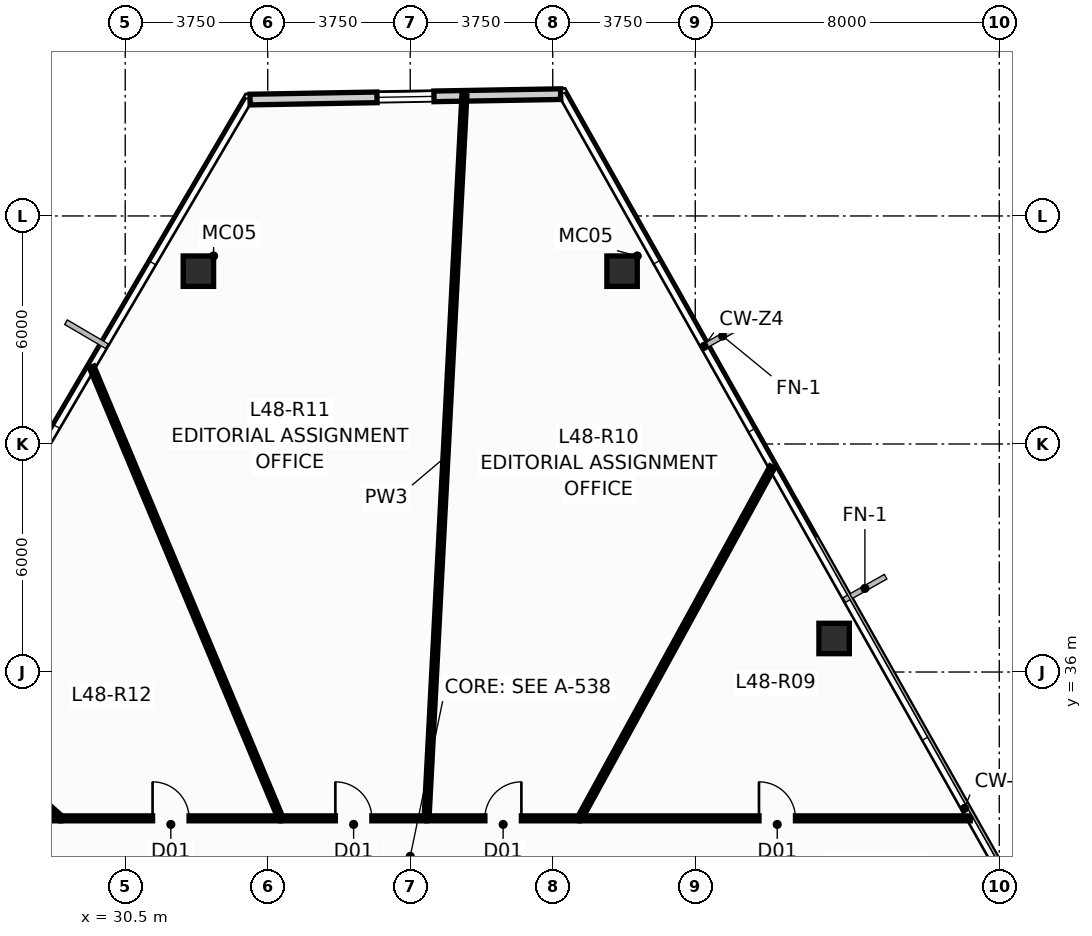
"""IFC4 building model, lengths in metres.
Left out: names, types, materials, properties, quantities, classifications, styles, units other than length and angle.
Written with IfcOpenShell. Run it as: python <this file> out.ifc"""

import sys

from ifc_helpers import new_model, si_unit, direction, frame, frame_2d, origin, origin_2d, place, context, subcontext, project, spatial, rectangle, hollow_rectangle, extrude, source, transform, mapped, element, fill, save


model = new_model("IFC4")
c1 = context("Model", 3, precision=1e-05, world=origin(), true_north=direction((0.0, 1.0)))
c2 = subcontext(c1, "Body", "Model", "MODEL_VIEW")
j1 = project(units=[si_unit("LENGTHUNIT", "METRE"), si_unit("PLANEANGLEUNIT", "RADIAN")], contexts=[c1])
p1 = place(None, origin())
s1 = spatial("IfcSite", under=j1, at=p1, CompositionType="ELEMENT")
p2 = place(p1, origin())
s2 = spatial("IfcBuilding", under=s1, at=p2, CompositionType="ELEMENT")
p3 = place(p2, frame((0.0, 0.0, 184.05)))
s3 = spatial("IfcBuildingStorey", under=s2, at=p3, CompositionType="ELEMENT", Elevation=184.05)
m1 = source(origin(), c2, "Body", "SweptSolid", [
    extrude(hollow_rectangle(XDim=0.8, YDim=0.8, WallThickness=0.045, at=origin_2d()), origin(), (0.0, 0.0, 1.0), 3.651),
])
for number, where, z_axis, x_axis in (
    (1, (43.574, 46.547, 0.0), (-0.024, 0.002, 1.0), (-0.073, -0.997, 0.0)),
    (2, (32.426, 46.547, 0.0), (0.024, 0.002, 1.0), (-0.073, 0.997, 0.0)),
):
    element("IfcColumn", number, at=place(p3, frame(where, z_axis=z_axis, x_axis=x_axis)), inside=s3, PredefinedType="COLUMN", context=c2, shape_type="MappedRepresentation", body=[
        mapped(m1, transform((0.0, 0.0, 0.0), scale=1.0)),
    ])
m2 = source(origin(), c2, "Body", "SweptSolid", [
    extrude(hollow_rectangle(XDim=0.8, YDim=0.8, WallThickness=0.045, at=origin_2d()), origin(), (0.0, 0.0, 1.0), 3.651),
])
p4 = place(p3, frame((49.154, 36.883, 0.0), z_axis=(-0.019393993486, -0.006018825565, 0.999793802119), x_axis=(0.296399214872, -0.955064136811, 0.0)))
e3 = element("IfcColumn", 3, at=p4, inside=s3, PredefinedType="COLUMN", context=c2, shape_type="MappedRepresentation", body=[
    mapped(m2, transform((0.0, 0.0, 0.0), scale=1.0)),
])
p5 = place(p3, frame((33.785, 51.062, 0.0), z_axis=(0.0, 0.0, 1.0), x_axis=(0.999846867057, 0.01749978388, 0.0)))
e4 = element("IfcWall", 4, at=p5, inside=s3, PredefinedType="STANDARD", context=c2, shape_type="SweptSolid", body=[
    extrude(rectangle(XDim=8.175, YDim=0.28, at=frame_2d((4.088, 0.0))), origin(), (0.0, 0.0, 1.0), 3.4),
])
p6 = place(p5, frame((3.34, 0.0, 0.9)))
e5 = element("IfcOpeningElement", 5, at=p6, cuts=e4, PredefinedType="OPENING", context=c2, shape_type="SweptSolid", body=[
    extrude(rectangle(XDim=1.5, YDim=1.8, at=frame_2d((0.75, 0.9))), frame((0.0, 0.152, 0.0), z_axis=(0.0, -1.0, 0.0), x_axis=(1.0, 0.0, 0.0)), (0.0, 0.0, 1.0), 0.304),
])
p7 = place(p3, frame((38.43, 32.155, 0.0), z_axis=(0.0, 0.0, 1.0), x_axis=(0.052271420181, 0.998632914855, 0.0)))
e6 = element("IfcWall", 6, at=p7, inside=s3, PredefinedType="PARTITIONING", context=c2, shape_type="SweptSolid", body=[
    extrude(rectangle(XDim=19.038, YDim=0.13, at=frame_2d((9.519, 0.0))), origin(), (0.0, 0.0, 1.0), 3.4),
])
p8 = place(p3, frame((29.618, 44.026, 0.0), z_axis=(0.0, 0.0, 1.0), x_axis=(0.386205658776, -0.922412700004, 0.0)))
e7 = element("IfcWall", 7, at=p8, inside=s3, PredefinedType="PARTITIONING", context=c2, shape_type="SweptSolid", body=[
    extrude(rectangle(XDim=12.869, YDim=0.13, at=frame_2d((6.435, 0.0))), origin(), (0.0, 0.0, 1.0), 3.4),
])
p9 = place(p3, frame((42.462, 32.154, 0.0), z_axis=(0.0, 0.0, 1.0), x_axis=(0.480713085345, 0.876877944516, 0.0)))
e8 = element("IfcWall", 8, at=p9, inside=s3, PredefinedType="PARTITIONING", context=c2, shape_type="SweptSolid", body=[
    extrude(rectangle(XDim=10.537, YDim=0.13, at=frame_2d((5.269, 0.0))), origin(), (0.0, 0.0, 1.0), 3.4),
])
p10 = place(p3, frame((42.465, 32.15, 0.0), z_axis=(0.0, 0.0, 1.0), x_axis=(1.0, 0.0, 0.0)))
e9 = element("IfcWall", 9, at=p10, inside=s3, PredefinedType="PARTITIONING", context=c2, shape_type="SweptSolid", body=[
    extrude(rectangle(XDim=10.273, YDim=0.13, at=frame_2d((5.137, 0.0))), origin(), (0.0, 0.0, 1.0), 3.4),
])
p11 = place(p10, frame((4.712, 0.0, 0.0)))
e10 = element("IfcOpeningElement", 10, at=p11, cuts=e9, PredefinedType="OPENING", context=c2, shape_type="SweptSolid", body=[
    extrude(rectangle(XDim=0.96, YDim=2.15, at=frame_2d((0.48, 1.075))), frame((0.0, 0.077, 0.0), z_axis=(0.0, -1.0, 0.0), x_axis=(1.0, 0.0, 0.0)), (0.0, 0.0, 1.0), 0.154),
])
p12 = place(p3, frame((22.645, 32.15, 0.0), z_axis=(0.0, 0.0, 1.0), x_axis=(1.0, 0.0, 0.0)))
e11 = element("IfcWall", 11, at=p12, inside=s3, PredefinedType="PARTITIONING", context=c2, shape_type="SweptSolid", body=[
    extrude(rectangle(XDim=6.16, YDim=0.13, at=frame_2d((3.08, 0.0))), origin(), (0.0, 0.0, 1.0), 3.4),
])
p13 = place(p12, frame((3.24, 0.0, 0.0)))
e12 = element("IfcOpeningElement", 12, at=p13, cuts=e11, PredefinedType="OPENING", context=c2, shape_type="SweptSolid", body=[
    extrude(rectangle(XDim=0.96, YDim=2.15, at=frame_2d((0.48, 1.075))), frame((0.0, 0.077, 0.0), z_axis=(0.0, -1.0, 0.0), x_axis=(1.0, 0.0, 0.0)), (0.0, 0.0, 1.0), 0.154),
])
p14 = place(p3, frame((28.815, 32.15, 0.0), z_axis=(0.0, 0.0, 1.0), x_axis=(1.0, 0.0, 0.0)))
e13 = element("IfcWall", 13, at=p14, inside=s3, PredefinedType="PARTITIONING", context=c2, shape_type="SweptSolid", body=[
    extrude(rectangle(XDim=5.77, YDim=0.13, at=frame_2d((2.885, 0.0))), origin(), (0.0, 0.0, 1.0), 3.4),
])
p15 = place(p14, frame((2.405, 0.0, 0.0)))
e14 = element("IfcOpeningElement", 14, at=p15, cuts=e13, PredefinedType="OPENING", context=c2, shape_type="SweptSolid", body=[
    extrude(rectangle(XDim=0.96, YDim=2.15, at=frame_2d((0.48, 1.075))), frame((0.0, 0.077, 0.0), z_axis=(0.0, -1.0, 0.0), x_axis=(1.0, 0.0, 0.0)), (0.0, 0.0, 1.0), 0.154),
])
p16 = place(p3, frame((24.755, 35.744, 0.0), z_axis=(0.0, 0.0, 1.0), x_axis=(0.748356606389, -0.663296607615, 0.0)))
e15 = element("IfcWall", 15, at=p16, inside=s3, PredefinedType="PARTITIONING", context=c2, shape_type="SweptSolid", body=[
    extrude(rectangle(XDim=5.413, YDim=0.13, at=frame_2d((2.707, 0.0))), origin(), (0.0, 0.0, 1.0), 2.925),
])
p17 = place(p3, frame((38.435, 32.15, 0.0), z_axis=(0.0, 0.0, 1.0), x_axis=(1.0, 0.0, 0.0)))
e16 = element("IfcWall", 16, at=p17, inside=s3, PredefinedType="PARTITIONING", context=c2, shape_type="SweptSolid", body=[
    extrude(rectangle(XDim=4.02, YDim=0.13, at=frame_2d((2.01, 0.0))), origin(), (0.0, 0.0, 1.0), 3.4),
])
p18 = place(p17, frame((1.53, 0.0, 0.0)))
e17 = element("IfcOpeningElement", 17, at=p18, cuts=e16, PredefinedType="OPENING", context=c2, shape_type="SweptSolid", body=[
    extrude(rectangle(XDim=0.96, YDim=2.15, at=frame_2d((0.48, 1.075))), frame((0.0, 0.077, 0.0), z_axis=(0.0, -1.0, 0.0), x_axis=(1.0, 0.0, 0.0)), (0.0, 0.0, 1.0), 0.154),
])
p19 = place(p3, frame((34.595, 32.15, 0.0), z_axis=(0.0, 0.0, 1.0), x_axis=(1.0, 0.0, 0.0)))
e18 = element("IfcWall", 18, at=p19, inside=s3, PredefinedType="PARTITIONING", context=c2, shape_type="SweptSolid", body=[
    extrude(rectangle(XDim=3.83, YDim=0.13, at=frame_2d((1.915, 0.0))), origin(), (0.0, 0.0, 1.0), 3.4),
])
p20 = place(p19, frame((1.435, 0.0, 0.0)))
e19 = element("IfcOpeningElement", 19, at=p20, cuts=e18, PredefinedType="OPENING", context=c2, shape_type="SweptSolid", body=[
    extrude(rectangle(XDim=0.96, YDim=2.15, at=frame_2d((0.48, 1.075))), frame((0.0, 0.077, 0.0), z_axis=(0.0, -1.0, 0.0), x_axis=(1.0, 0.0, 0.0)), (0.0, 0.0, 1.0), 0.154),
])
p21 = place(p6, origin())
e20 = element("IfcWindow", 20, at=p21, inside=s3, PartitioningType="SINGLE_PANEL", PredefinedType="WINDOW", context=c2, shape_type="SweptSolid", body=[
    extrude(rectangle(XDim=1.5, YDim=1.8, at=frame_2d((0.75, 0.9))), frame((0.0, 0.03, 0.0), z_axis=(0.0, -1.0, 0.0), x_axis=(1.0, 0.0, 0.0)), (0.0, 0.0, 1.0), 0.06),
])
fill(e5, e20)
p22 = place(p11, origin())
e21 = element("IfcDoor", 21, at=p22, inside=s3, OperationType="SINGLE_SWING_LEFT", PredefinedType="DOOR", context=c2, shape_type="SweptSolid", body=[
    extrude(rectangle(XDim=0.96, YDim=2.15, at=frame_2d((0.48, 1.075))), frame((0.0, 0.025, 0.0), z_axis=(0.0, -1.0, 0.0), x_axis=(1.0, 0.0, 0.0)), (0.0, 0.0, 1.0), 0.05),
])
fill(e10, e21)
p23 = place(p15, origin())
e22 = element("IfcDoor", 22, at=p23, inside=s3, OperationType="SINGLE_SWING_LEFT", PredefinedType="DOOR", context=c2, shape_type="SweptSolid", body=[
    extrude(rectangle(XDim=0.96, YDim=2.15, at=frame_2d((0.48, 1.075))), frame((0.0, 0.025, 0.0), z_axis=(0.0, -1.0, 0.0), x_axis=(1.0, 0.0, 0.0)), (0.0, 0.0, 1.0), 0.05),
])
fill(e14, e22)
p24 = place(p18, origin())
e23 = element("IfcDoor", 23, at=p24, inside=s3, OperationType="SINGLE_SWING_RIGHT", PredefinedType="DOOR", context=c2, shape_type="SweptSolid", body=[
    extrude(rectangle(XDim=0.96, YDim=2.15, at=frame_2d((0.48, 1.075))), frame((0.0, 0.025, 0.0), z_axis=(0.0, -1.0, 0.0), x_axis=(1.0, 0.0, 0.0)), (0.0, 0.0, 1.0), 0.05),
])
fill(e17, e23)
p25 = place(p20, origin())
e24 = element("IfcDoor", 24, at=p25, inside=s3, OperationType="SINGLE_SWING_LEFT", PredefinedType="DOOR", context=c2, shape_type="SweptSolid", body=[
    extrude(rectangle(XDim=0.96, YDim=2.15, at=frame_2d((0.48, 1.075))), frame((0.0, 0.025, 0.0), z_axis=(0.0, -1.0, 0.0), x_axis=(1.0, 0.0, 0.0)), (0.0, 0.0, 1.0), 0.05),
])
fill(e19, e24)
save(model, sys.argv[1])
